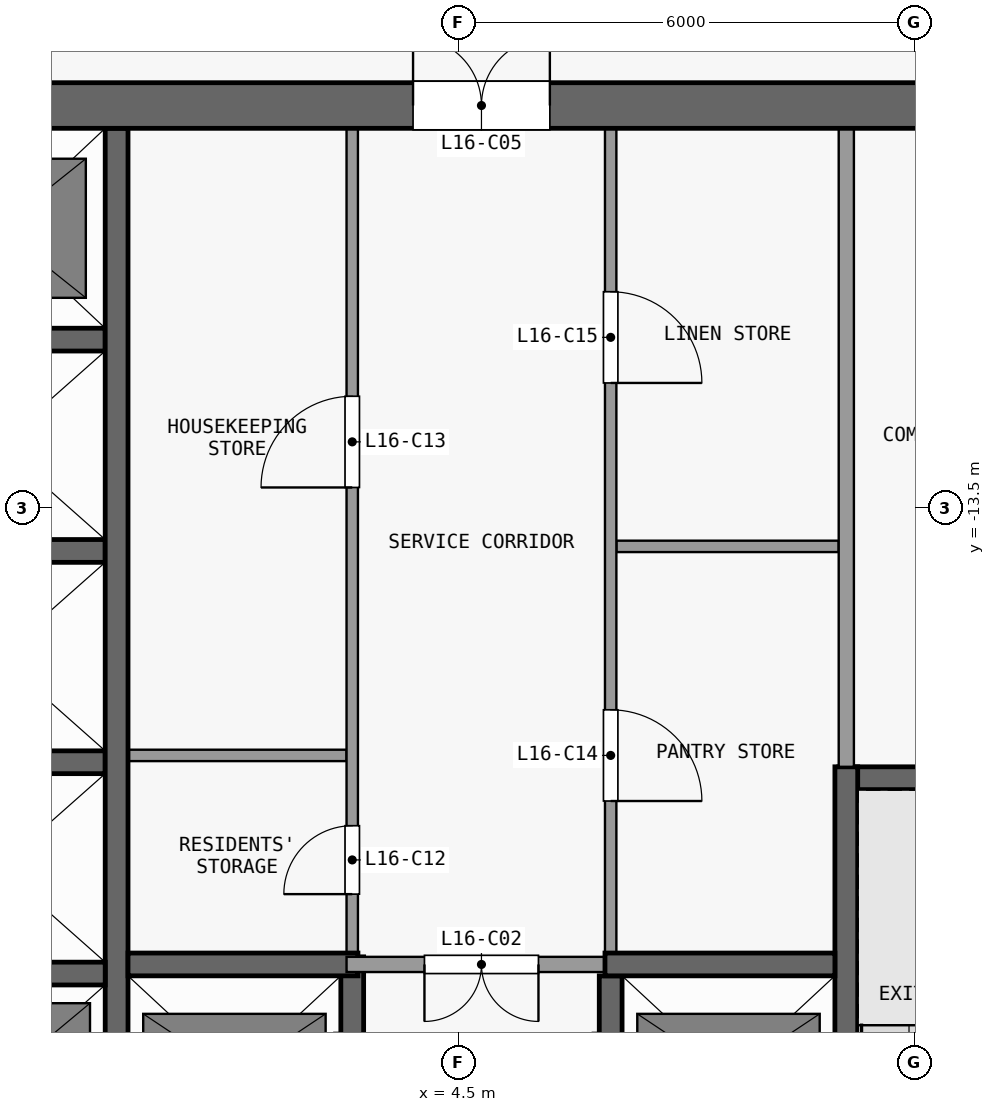
"""IFC4 building model, lengths in metres.
Left out: names, types, materials, properties, quantities, classifications, styles, units other than length and angle.
Written with IfcOpenShell. Run it as: python <this file> out.ifc"""

import sys

from ifc_helpers import new_model, si_unit, direction, frame, frame_2d, origin, place, context, subcontext, project, spatial, rectangle, extrude, element, fill, save


model = new_model("IFC4")
c1 = context("Model", 3, precision=1e-05, world=origin(), true_north=direction((0.0, 1.0)))
c2 = subcontext(c1, "Body", "Model", "MODEL_VIEW")
j1 = project(units=[si_unit("LENGTHUNIT", "METRE"), si_unit("PLANEANGLEUNIT", "RADIAN")], contexts=[c1])
p1 = place(None, origin())
s1 = spatial("IfcSite", under=j1, at=p1, CompositionType="ELEMENT")
p2 = place(p1, origin())
s2 = spatial("IfcBuilding", under=s1, at=p2, CompositionType="ELEMENT")
p3 = place(p2, frame((0.0, 0.0, 68.5)))
s3 = spatial("IfcBuildingStorey", under=s2, at=p3, CompositionType="ELEMENT", Elevation=68.5)
p4 = place(p3, frame((-13.5, -8.2, 0.0), z_axis=(0.0, 0.0, 1.0), x_axis=(1.0, 0.0, 0.0)))
e1 = element("IfcWall", 1, at=p4, inside=s3, PredefinedType="SHEAR", context=c2, shape_type="SweptSolid", body=[
    extrude(rectangle(XDim=27.0, YDim=0.6, at=frame_2d((13.5, 0.0))), origin(), (0.0, 0.0, 1.0), 3.3),
])
p5 = place(p4, frame((7.8, 0.0, 0.0)))
e2 = element("IfcOpeningElement", 2, at=p5, cuts=e1, PredefinedType="OPENING", context=c2, shape_type="SweptSolid", body=[
    extrude(rectangle(XDim=1.8, YDim=2.1, at=frame_2d((0.9, 1.05))), frame((0.0, 0.31, 0.0), z_axis=(0.0, -1.0, 0.0), x_axis=(1.0, 0.0, 0.0)), (0.0, 0.0, 1.0), 0.62),
])
p6 = place(p4, frame((17.4, 0.0, 0.0)))
e3 = element("IfcOpeningElement", 3, at=p6, cuts=e1, PredefinedType="OPENING", context=c2, shape_type="SweptSolid", body=[
    extrude(rectangle(XDim=1.8, YDim=2.1, at=frame_2d((0.9, 1.05))), frame((0.0, 0.31, 0.0), z_axis=(0.0, -1.0, 0.0), x_axis=(1.0, 0.0, 0.0)), (0.0, 0.0, 1.0), 0.62),
])
p7 = place(p4, frame((2.725, 0.0, 0.0)))
e4 = element("IfcOpeningElement", 4, at=p7, cuts=e1, PredefinedType="OPENING", context=c2, shape_type="SweptSolid", body=[
    extrude(rectangle(XDim=0.9, YDim=2.1, at=frame_2d((0.45, 1.05))), frame((0.0, 0.31, 0.0), z_axis=(0.0, -1.0, 0.0), x_axis=(1.0, 0.0, 0.0)), (0.0, 0.0, 1.0), 0.62),
])
p8 = place(p4, frame((24.075, 0.0, 0.0)))
e5 = element("IfcOpeningElement", 5, at=p8, cuts=e1, PredefinedType="OPENING", context=c2, shape_type="SweptSolid", body=[
    extrude(rectangle(XDim=1.2, YDim=2.1, at=frame_2d((0.6, 1.05))), frame((0.0, 0.31, 0.0), z_axis=(0.0, -1.0, 0.0), x_axis=(1.0, 0.0, 0.0)), (0.0, 0.0, 1.0), 0.62),
])
p9 = place(p3, frame((-2.95, -19.62, 0.0), z_axis=(0.0, 0.0, 1.0), x_axis=(1.0, 0.0, 0.0)))
e6 = element("IfcWall", 6, at=p9, inside=s3, PredefinedType="SHEAR", context=c2, shape_type="SweptSolid", body=[
    extrude(rectangle(XDim=2.8, YDim=0.3, at=frame_2d((1.4, 0.0))), origin(), (0.0, 0.0, 1.0), 3.3),
])
p10 = place(p3, frame((0.15, -19.5, 0.0), z_axis=(0.0, 0.0, 1.0), x_axis=(1.0, 0.0, 0.0)))
e7 = element("IfcWall", 7, at=p10, inside=s3, PredefinedType="SHEAR", context=c2, shape_type="SweptSolid", body=[
    extrude(rectangle(XDim=3.025, YDim=0.3, at=frame_2d((1.513, 0.0))), origin(), (0.0, 0.0, 1.0), 3.3),
])
p11 = place(p3, frame((6.575, -19.5, 0.0), z_axis=(0.0, 0.0, 1.0), x_axis=(-1.0, 0.0, 0.0)))
e8 = element("IfcWall", 8, at=p11, inside=s3, PredefinedType="PARTITIONING", context=c2, shape_type="SweptSolid", body=[
    extrude(rectangle(XDim=3.55, YDim=0.2, at=frame_2d((1.775, 0.0))), origin(), (0.0, 0.0, 1.0), 3.3),
])
p12 = place(p11, frame((1.025, 0.0, 0.0)))
e9 = element("IfcOpeningElement", 9, at=p12, cuts=e8, PredefinedType="OPENING", context=c2, shape_type="SweptSolid", body=[
    extrude(rectangle(XDim=1.5, YDim=2.1, at=frame_2d((0.75, 1.05))), frame((0.0, 0.11, 0.0), z_axis=(0.0, -1.0, 0.0), x_axis=(1.0, 0.0, 0.0)), (0.0, 0.0, 1.0), 0.22),
])
p13 = place(p3, frame((6.425, -19.5, 0.0), z_axis=(0.0, 0.0, 1.0), x_axis=(1.0, 0.0, 0.0)))
e10 = element("IfcWall", 10, at=p13, inside=s3, PredefinedType="SHEAR", context=c2, shape_type="SweptSolid", body=[
    extrude(rectangle(XDim=3.025, YDim=0.3, at=frame_2d((1.512, 0.0))), origin(), (0.0, 0.0, 1.0), 3.3),
])
p14 = place(p3, frame((9.5, -17.05, 0.0), z_axis=(0.0, 0.0, 1.0), x_axis=(1.0, 0.0, 0.0)))
e11 = element("IfcWall", 11, at=p14, inside=s3, PredefinedType="SHEAR", context=c2, shape_type="SweptSolid", body=[
    extrude(rectangle(XDim=3.1, YDim=0.3, at=frame_2d((1.55, 0.0))), origin(), (0.0, 0.0, 1.0), 3.3),
])
p15 = place(p3, frame((-2.95, -16.84, 0.0), z_axis=(0.0, 0.0, 1.0), x_axis=(1.0, 0.0, 0.0)))
e12 = element("IfcWall", 12, at=p15, inside=s3, PredefinedType="SHEAR", context=c2, shape_type="SweptSolid", body=[
    extrude(rectangle(XDim=2.8, YDim=0.3, at=frame_2d((1.4, 0.0))), origin(), (0.0, 0.0, 1.0), 3.3),
])
p16 = place(p3, frame((0.15, -16.75, 0.0), z_axis=(0.0, 0.0, 1.0), x_axis=(1.0, 0.0, 0.0)))
e13 = element("IfcWall", 13, at=p16, inside=s3, PredefinedType="PARTITIONING", context=c2, shape_type="SweptSolid", body=[
    extrude(rectangle(XDim=2.875, YDim=0.15, at=frame_2d((1.438, 0.0))), origin(), (0.0, 0.0, 1.0), 3.3),
])
p17 = place(p3, frame((-2.95, -14.06, 0.0), z_axis=(0.0, 0.0, 1.0), x_axis=(1.0, 0.0, 0.0)))
e14 = element("IfcWall", 14, at=p17, inside=s3, PredefinedType="SHEAR", context=c2, shape_type="SweptSolid", body=[
    extrude(rectangle(XDim=2.8, YDim=0.3, at=frame_2d((1.4, 0.0))), origin(), (0.0, 0.0, 1.0), 3.3),
])
p18 = place(p3, frame((6.575, -14.0, 0.0), z_axis=(0.0, 0.0, 1.0), x_axis=(1.0, 0.0, 0.0)))
e15 = element("IfcWall", 15, at=p18, inside=s3, PredefinedType="PARTITIONING", context=c2, shape_type="SweptSolid", body=[
    extrude(rectangle(XDim=2.925, YDim=0.15, at=frame_2d((1.462, 0.0))), origin(), (0.0, 0.0, 1.0), 3.3),
])
p19 = place(p3, frame((-2.95, -11.28, 0.0), z_axis=(0.0, 0.0, 1.0), x_axis=(1.0, 0.0, 0.0)))
e16 = element("IfcWall", 16, at=p19, inside=s3, PredefinedType="SHEAR", context=c2, shape_type="SweptSolid", body=[
    extrude(rectangle(XDim=2.8, YDim=0.3, at=frame_2d((1.4, 0.0))), origin(), (0.0, 0.0, 1.0), 3.3),
])
p20 = place(p3, frame((0.0, -22.25, 0.0), z_axis=(0.0, 0.0, 1.0), x_axis=(0.0, 1.0, 0.0)))
e17 = element("IfcWall", 17, at=p20, inside=s3, PredefinedType="SHEAR", context=c2, shape_type="SweptSolid", body=[
    extrude(rectangle(XDim=13.75, YDim=0.3, at=frame_2d((6.875, 0.0))), origin(), (0.0, 0.0, 1.0), 3.3),
])
p21 = place(p3, frame((3.1, -22.25, 0.0), z_axis=(0.0, 0.0, 1.0), x_axis=(0.0, 1.0, 0.0)))
e18 = element("IfcWall", 18, at=p21, inside=s3, PredefinedType="SHEAR", context=c2, shape_type="SweptSolid", body=[
    extrude(rectangle(XDim=2.85, YDim=0.3, at=frame_2d((1.425, 0.0))), origin(), (0.0, 0.0, 1.0), 3.3),
])
p22 = place(p21, frame((0.75, 0.0, 0.0)))
e19 = element("IfcOpeningElement", 19, at=p22, cuts=e18, PredefinedType="OPENING", context=c2, shape_type="SweptSolid", body=[
    extrude(rectangle(XDim=1.1, YDim=2.1, at=frame_2d((0.55, 1.05))), frame((0.0, 0.16, 0.0), z_axis=(0.0, -1.0, 0.0), x_axis=(1.0, 0.0, 0.0)), (0.0, 0.0, 1.0), 0.32),
])
p23 = place(p3, frame((3.1, -19.4, 0.0), z_axis=(0.0, 0.0, 1.0), x_axis=(0.0, 1.0, 0.0)))
e20 = element("IfcWall", 20, at=p23, inside=s3, PredefinedType="PARTITIONING", context=c2, shape_type="SweptSolid", body=[
    extrude(rectangle(XDim=10.9, YDim=0.15, at=frame_2d((5.45, 0.0))), origin(), (0.0, 0.0, 1.0), 3.3),
])
p24 = place(p23, frame((0.825, 0.0, 0.0)))
e21 = element("IfcOpeningElement", 21, at=p24, cuts=e20, PredefinedType="OPENING", context=c2, shape_type="SweptSolid", body=[
    extrude(rectangle(XDim=0.9, YDim=2.1, at=frame_2d((0.45, 1.05))), frame((0.0, 0.085, 0.0), z_axis=(0.0, -1.0, 0.0), x_axis=(1.0, 0.0, 0.0)), (0.0, 0.0, 1.0), 0.17),
])
p25 = place(p23, frame((6.175, 0.0, 0.0)))
e22 = element("IfcOpeningElement", 22, at=p25, cuts=e20, PredefinedType="OPENING", context=c2, shape_type="SweptSolid", body=[
    extrude(rectangle(XDim=1.2, YDim=2.1, at=frame_2d((0.6, 1.05))), frame((0.0, 0.085, 0.0), z_axis=(0.0, -1.0, 0.0), x_axis=(1.0, 0.0, 0.0)), (0.0, 0.0, 1.0), 0.17),
])
p26 = place(p3, frame((6.5, -22.25, 0.0), z_axis=(0.0, 0.0, 1.0), x_axis=(0.0, 1.0, 0.0)))
e23 = element("IfcWall", 23, at=p26, inside=s3, PredefinedType="SHEAR", context=c2, shape_type="SweptSolid", body=[
    extrude(rectangle(XDim=2.6, YDim=0.3, at=frame_2d((1.3, 0.0))), origin(), (0.0, 0.0, 1.0), 3.3),
])
p27 = place(p26, frame((0.75, 0.0, 0.0)))
e24 = element("IfcOpeningElement", 24, at=p27, cuts=e23, PredefinedType="OPENING", context=c2, shape_type="SweptSolid", body=[
    extrude(rectangle(XDim=1.1, YDim=2.1, at=frame_2d((0.55, 1.05))), frame((0.0, 0.16, 0.0), z_axis=(0.0, -1.0, 0.0), x_axis=(1.0, 0.0, 0.0)), (0.0, 0.0, 1.0), 0.32),
])
p28 = place(p3, frame((6.5, -8.5, 0.0), z_axis=(0.0, 0.0, 1.0), x_axis=(0.0, -1.0, 0.0)))
e25 = element("IfcWall", 25, at=p28, inside=s3, PredefinedType="PARTITIONING", context=c2, shape_type="SweptSolid", body=[
    extrude(rectangle(XDim=10.85, YDim=0.15, at=frame_2d((5.425, 0.0))), origin(), (0.0, 0.0, 1.0), 3.3),
])
p29 = place(p28, frame((7.65, 0.0, 0.0)))
e26 = element("IfcOpeningElement", 26, at=p29, cuts=e25, PredefinedType="OPENING", context=c2, shape_type="SweptSolid", body=[
    extrude(rectangle(XDim=1.2, YDim=2.1, at=frame_2d((0.6, 1.05))), frame((0.0, 0.085, 0.0), z_axis=(0.0, -1.0, 0.0), x_axis=(1.0, 0.0, 0.0)), (0.0, 0.0, 1.0), 0.17),
])
p30 = place(p28, frame((2.15, 0.0, 0.0)))
e27 = element("IfcOpeningElement", 27, at=p30, cuts=e25, PredefinedType="OPENING", context=c2, shape_type="SweptSolid", body=[
    extrude(rectangle(XDim=1.2, YDim=2.1, at=frame_2d((0.6, 1.05))), frame((0.0, 0.085, 0.0), z_axis=(0.0, -1.0, 0.0), x_axis=(1.0, 0.0, 0.0)), (0.0, 0.0, 1.0), 0.17),
])
p31 = place(p3, frame((9.6, -16.9, 0.0), z_axis=(0.0, 0.0, 1.0), x_axis=(0.0, -1.0, 0.0)))
e28 = element("IfcWall", 28, at=p31, inside=s3, PredefinedType="SHEAR", context=c2, shape_type="SweptSolid", body=[
    extrude(rectangle(XDim=7.7, YDim=0.3, at=frame_2d((3.85, 0.0))), origin(), (0.0, 0.0, 1.0), 3.3),
])
p32 = place(p31, frame((6.5, 0.0, 0.0)))
e29 = element("IfcOpeningElement", 29, at=p32, cuts=e28, PredefinedType="OPENING", context=c2, shape_type="SweptSolid", body=[
    extrude(rectangle(XDim=1.1, YDim=2.1, at=frame_2d((0.55, 1.05))), frame((0.0, 0.16, 0.0), z_axis=(0.0, -1.0, 0.0), x_axis=(1.0, 0.0, 0.0)), (0.0, 0.0, 1.0), 0.32),
])
p33 = place(p3, frame((9.6, -16.9, 0.0), z_axis=(0.0, 0.0, 1.0), x_axis=(0.0, 1.0, 0.0)))
e30 = element("IfcWall", 30, at=p33, inside=s3, PredefinedType="PARTITIONING", context=c2, shape_type="SweptSolid", body=[
    extrude(rectangle(XDim=8.4, YDim=0.2, at=frame_2d((4.2, 0.0))), origin(), (0.0, 0.0, 1.0), 3.3),
])
p34 = place(p12, origin())
e31 = element("IfcDoor", 31, at=p34, inside=s3, OperationType="DOUBLE_DOOR_SINGLE_SWING", PredefinedType="DOOR", context=c2, shape_type="SweptSolid", body=[
    extrude(rectangle(XDim=1.5, YDim=2.1, at=frame_2d((0.75, 1.05))), frame((0.0, 0.025, 0.0), z_axis=(0.0, -1.0, 0.0), x_axis=(1.0, 0.0, 0.0)), (0.0, 0.0, 1.0), 0.05),
])
fill(e9, e31)
p35 = place(p6, origin())
e32 = element("IfcDoor", 32, at=p35, inside=s3, OperationType="DOUBLE_DOOR_SINGLE_SWING", PredefinedType="DOOR", context=c2, shape_type="SweptSolid", body=[
    extrude(rectangle(XDim=1.8, YDim=2.1, at=frame_2d((0.9, 1.05))), frame((0.0, 0.025, 0.0), z_axis=(0.0, -1.0, 0.0), x_axis=(1.0, 0.0, 0.0)), (0.0, 0.0, 1.0), 0.05),
])
fill(e3, e32)
p36 = place(p24, origin())
e33 = element("IfcDoor", 33, at=p36, inside=s3, OperationType="SINGLE_SWING_LEFT", PredefinedType="DOOR", context=c2, shape_type="SweptSolid", body=[
    extrude(rectangle(XDim=0.9, YDim=2.1, at=frame_2d((0.45, 1.05))), frame((0.0, 0.025, 0.0), z_axis=(0.0, -1.0, 0.0), x_axis=(1.0, 0.0, 0.0)), (0.0, 0.0, 1.0), 0.05),
])
fill(e21, e33)
p37 = place(p25, origin())
e34 = element("IfcDoor", 34, at=p37, inside=s3, OperationType="SINGLE_SWING_LEFT", PredefinedType="DOOR", context=c2, shape_type="SweptSolid", body=[
    extrude(rectangle(XDim=1.2, YDim=2.1, at=frame_2d((0.6, 1.05))), frame((0.0, 0.025, 0.0), z_axis=(0.0, -1.0, 0.0), x_axis=(1.0, 0.0, 0.0)), (0.0, 0.0, 1.0), 0.05),
])
fill(e22, e34)
p38 = place(p29, origin())
e35 = element("IfcDoor", 35, at=p38, inside=s3, OperationType="SINGLE_SWING_RIGHT", PredefinedType="DOOR", context=c2, shape_type="SweptSolid", body=[
    extrude(rectangle(XDim=1.2, YDim=2.1, at=frame_2d((0.6, 1.05))), frame((0.0, 0.025, 0.0), z_axis=(0.0, -1.0, 0.0), x_axis=(1.0, 0.0, 0.0)), (0.0, 0.0, 1.0), 0.05),
])
fill(e26, e35)
p39 = place(p30, origin())
e36 = element("IfcDoor", 36, at=p39, inside=s3, OperationType="SINGLE_SWING_RIGHT", PredefinedType="DOOR", context=c2, shape_type="SweptSolid", body=[
    extrude(rectangle(XDim=1.2, YDim=2.1, at=frame_2d((0.6, 1.05))), frame((0.0, 0.025, 0.0), z_axis=(0.0, -1.0, 0.0), x_axis=(1.0, 0.0, 0.0)), (0.0, 0.0, 1.0), 0.05),
])
fill(e27, e36)
save(model, sys.argv[1])
